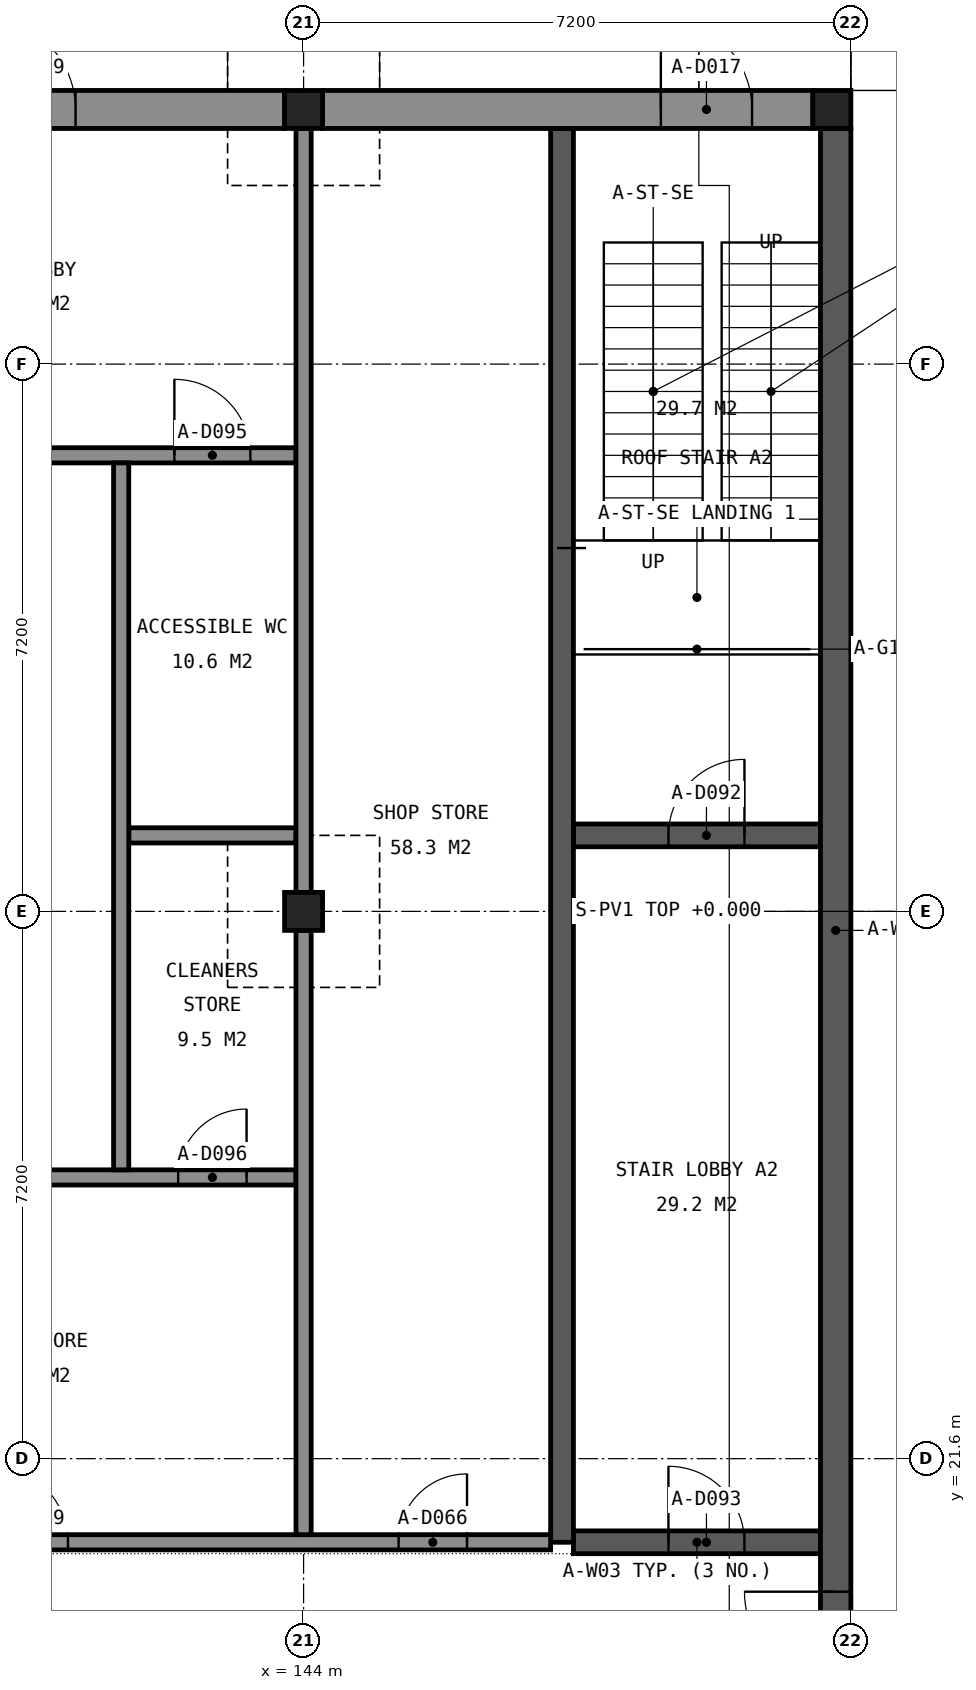
"""IFC4 building model, lengths in metres.
Left out: names, types, materials, properties, quantities, classifications, styles, units other than length and angle.
Written with IfcOpenShell. Run it as: python <this file> out.ifc"""

import sys

from ifc_helpers import new_model, si_unit, direction, frame, frame_2d, origin, origin_2d, place, context, subcontext, project, spatial, rectangle, extrude, element, fill, save


model = new_model("IFC4")
c1 = context("Model", 3, precision=1e-05, world=origin(), true_north=direction((0.0, 1.0)))
c2 = subcontext(c1, "Body", "Model", "MODEL_VIEW")
j1 = project(units=[si_unit("LENGTHUNIT", "METRE"), si_unit("PLANEANGLEUNIT", "RADIAN")], contexts=[c1])
p1 = place(None, origin())
s1 = spatial("IfcSite", under=j1, at=p1, CompositionType="ELEMENT")
p2 = place(p1, origin())
s2 = spatial("IfcBuilding", under=s1, at=p2, CompositionType="ELEMENT")
p3 = place(p2, origin())
s3 = spatial("IfcBuildingStorey", under=s2, at=p3, CompositionType="ELEMENT", Elevation=0.0)
for number, where, z_axis, x_axis in (
    (1, (144.0, 39.35, 0.0), (0.0, 0.0, 1.0), (1.0, 0.0, 0.0)),
    (2, (150.95, 39.35, 0.0), (0.0, 0.0, 1.0), (1.0, 0.0, 0.0)),
    (3, (144.0, 28.8, 0.0), (0.0, 0.0, 1.0), (1.0, 0.0, 0.0)),
):
    element("IfcColumn", number, at=place(p3, frame(where, z_axis=z_axis, x_axis=x_axis)), inside=s3, PredefinedType="COLUMN", context=c2, shape_type="SweptSolid", body=[
        extrude(rectangle(XDim=0.5, YDim=0.5, at=origin_2d()), origin(), (0.0, 0.0, 1.0), 3.7),
    ])
p4 = place(p3, frame((147.55, 20.5, 0.0), z_axis=(0.0, 0.0, 1.0), x_axis=(1.0, 0.0, 0.0)))
e4 = element("IfcWall", 4, at=p4, inside=s3, PredefinedType="SHEAR", context=c2, shape_type="SweptSolid", body=[
    extrude(rectangle(XDim=3.25, YDim=0.3, at=frame_2d((1.625, 0.0))), origin(), (0.0, 0.0, 1.0), 4.4),
])
p5 = place(p4, frame((1.25, 0.0, 0.0)))
e5 = element("IfcOpeningElement", 5, at=p5, cuts=e4, PredefinedType="OPENING", context=c2, shape_type="SweptSolid", body=[
    extrude(rectangle(XDim=1.0, YDim=2.1, at=frame_2d((0.5, 1.05))), frame((0.0, 0.16, 0.0), z_axis=(0.0, -1.0, 0.0), x_axis=(1.0, 0.0, 0.0)), (0.0, 0.0, 1.0), 0.32),
])
p6 = place(p3, frame((147.55, 29.8, 0.0), z_axis=(0.0, 0.0, 1.0), x_axis=(1.0, 0.0, 0.0)))
e6 = element("IfcWall", 6, at=p6, inside=s3, PredefinedType="SHEAR", context=c2, shape_type="SweptSolid", body=[
    extrude(rectangle(XDim=3.25, YDim=0.3, at=frame_2d((1.625, 0.0))), origin(), (0.0, 0.0, 1.0), 4.4),
])
p7 = place(p6, frame((1.25, 0.0, 0.0)))
e7 = element("IfcOpeningElement", 7, at=p7, cuts=e6, PredefinedType="OPENING", context=c2, shape_type="SweptSolid", body=[
    extrude(rectangle(XDim=1.0, YDim=2.1, at=frame_2d((0.5, 1.05))), frame((0.0, 0.16, 0.0), z_axis=(0.0, -1.0, 0.0), x_axis=(1.0, 0.0, 0.0)), (0.0, 0.0, 1.0), 0.32),
])
p8 = place(p3, frame((147.4, 20.5, 0.0), z_axis=(0.0, 0.0, 1.0), x_axis=(0.0, 1.0, 0.0)))
e8 = element("IfcWall", 8, at=p8, inside=s3, PredefinedType="SHEAR", context=c2, shape_type="SweptSolid", body=[
    extrude(rectangle(XDim=18.6, YDim=0.3, at=frame_2d((9.3, 0.0))), origin(), (0.0, 0.0, 1.0), 4.4),
])
p9 = place(p3, frame((151.0, 18.0, 0.0), z_axis=(0.0, 0.0, 1.0), x_axis=(0.0, 1.0, 0.0)))
e9 = element("IfcWall", 9, at=p9, inside=s3, PredefinedType="SHEAR", context=c2, shape_type="SweptSolid", body=[
    extrude(rectangle(XDim=21.1, YDim=0.4, at=frame_2d((10.55, 0.0))), origin(), (0.0, 0.0, 1.0), 4.4),
])
p10 = place(p9, frame((0.65, 0.0, 0.0)))
e10 = element("IfcOpeningElement", 10, at=p10, cuts=e9, PredefinedType="OPENING", context=c2, shape_type="SweptSolid", body=[
    extrude(rectangle(XDim=1.2, YDim=2.1, at=frame_2d((0.6, 1.05))), frame((0.0, 0.21, 0.0), z_axis=(0.0, -1.0, 0.0), x_axis=(1.0, 0.0, 0.0)), (0.0, 0.0, 1.0), 0.42),
])
p11 = place(p3, frame((137.05, 39.35, 0.0), z_axis=(0.0, 0.0, 1.0), x_axis=(1.0, 0.0, 0.0)))
e11 = element("IfcWall", 11, at=p11, inside=s3, PredefinedType="SOLIDWALL", context=c2, shape_type="SweptSolid", body=[
    extrude(rectangle(XDim=6.7, YDim=0.5, at=frame_2d((3.35, 0.0))), origin(), (0.0, 0.0, 1.0), 3.6),
])
p12 = place(p11, frame((2.75, 0.0, 0.0)))
e12 = element("IfcOpeningElement", 12, at=p12, cuts=e11, PredefinedType="OPENING", context=c2, shape_type="SweptSolid", body=[
    extrude(rectangle(XDim=1.2, YDim=2.1, at=frame_2d((0.6, 1.05))), frame((0.0, 0.26, 0.0), z_axis=(0.0, -1.0, 0.0), x_axis=(1.0, 0.0, 0.0)), (0.0, 0.0, 1.0), 0.52),
])
p13 = place(p3, frame((144.25, 39.35, 0.0), z_axis=(0.0, 0.0, 1.0), x_axis=(1.0, 0.0, 0.0)))
e13 = element("IfcWall", 13, at=p13, inside=s3, PredefinedType="SOLIDWALL", context=c2, shape_type="SweptSolid", body=[
    extrude(rectangle(XDim=6.45, YDim=0.5, at=frame_2d((3.225, 0.0))), origin(), (0.0, 0.0, 1.0), 3.6),
])
p14 = place(p13, frame((4.45, 0.0, 0.0)))
e14 = element("IfcOpeningElement", 14, at=p14, cuts=e13, PredefinedType="OPENING", context=c2, shape_type="SweptSolid", body=[
    extrude(rectangle(XDim=1.2, YDim=2.1, at=frame_2d((0.6, 1.05))), frame((0.0, 0.26, 0.0), z_axis=(0.0, -1.0, 0.0), x_axis=(1.0, 0.0, 0.0)), (0.0, 0.0, 1.0), 0.52),
])
p15 = place(p3, frame((54.35, 20.5, 0.0), z_axis=(0.0, 0.0, 1.0), x_axis=(1.0, 0.0, 0.0)))
e15 = element("IfcWall", 15, at=p15, inside=s3, PredefinedType="PARTITIONING", context=c2, shape_type="SweptSolid", body=[
    extrude(rectangle(XDim=92.9, YDim=0.2, at=frame_2d((46.45, 0.0))), origin(), (0.0, 0.0, 1.0), 3.5),
])
p16 = place(p15, frame((1.1, 0.0, 0.0)))
e16 = element("IfcOpeningElement", 16, at=p16, cuts=e15, PredefinedType="OPENING", context=c2, shape_type="SweptSolid", body=[
    extrude(rectangle(XDim=0.9, YDim=2.1, at=frame_2d((0.45, 1.05))), frame((0.0, 0.11, 0.0), z_axis=(0.0, -1.0, 0.0), x_axis=(1.0, 0.0, 0.0)), (0.0, 0.0, 1.0), 0.22),
])
p17 = place(p15, frame((90.9, 0.0, 0.0)))
e17 = element("IfcOpeningElement", 17, at=p17, cuts=e15, PredefinedType="OPENING", context=c2, shape_type="SweptSolid", body=[
    extrude(rectangle(XDim=0.9, YDim=2.1, at=frame_2d((0.45, 1.05))), frame((0.0, 0.11, 0.0), z_axis=(0.0, -1.0, 0.0), x_axis=(1.0, 0.0, 0.0)), (0.0, 0.0, 1.0), 0.22),
])
p18 = place(p15, frame((6.35, 0.0, 0.0)))
e18 = element("IfcOpeningElement", 18, at=p18, cuts=e15, PredefinedType="OPENING", context=c2, shape_type="SweptSolid", body=[
    extrude(rectangle(XDim=1.0, YDim=2.1, at=frame_2d((0.5, 1.05))), frame((0.0, 0.11, 0.0), z_axis=(0.0, -1.0, 0.0), x_axis=(1.0, 0.0, 0.0)), (0.0, 0.0, 1.0), 0.22),
])
p19 = place(p15, frame((13.55, 0.0, 0.0)))
e19 = element("IfcOpeningElement", 19, at=p19, cuts=e15, PredefinedType="OPENING", context=c2, shape_type="SweptSolid", body=[
    extrude(rectangle(XDim=1.0, YDim=2.1, at=frame_2d((0.5, 1.05))), frame((0.0, 0.11, 0.0), z_axis=(0.0, -1.0, 0.0), x_axis=(1.0, 0.0, 0.0)), (0.0, 0.0, 1.0), 0.22),
])
p20 = place(p15, frame((20.75, 0.0, 0.0)))
e20 = element("IfcOpeningElement", 20, at=p20, cuts=e15, PredefinedType="OPENING", context=c2, shape_type="SweptSolid", body=[
    extrude(rectangle(XDim=1.0, YDim=2.1, at=frame_2d((0.5, 1.05))), frame((0.0, 0.11, 0.0), z_axis=(0.0, -1.0, 0.0), x_axis=(1.0, 0.0, 0.0)), (0.0, 0.0, 1.0), 0.22),
])
p21 = place(p15, frame((27.95, 0.0, 0.0)))
e21 = element("IfcOpeningElement", 21, at=p21, cuts=e15, PredefinedType="OPENING", context=c2, shape_type="SweptSolid", body=[
    extrude(rectangle(XDim=1.0, YDim=2.1, at=frame_2d((0.5, 1.05))), frame((0.0, 0.11, 0.0), z_axis=(0.0, -1.0, 0.0), x_axis=(1.0, 0.0, 0.0)), (0.0, 0.0, 1.0), 0.22),
])
p22 = place(p15, frame((35.15, 0.0, 0.0)))
e22 = element("IfcOpeningElement", 22, at=p22, cuts=e15, PredefinedType="OPENING", context=c2, shape_type="SweptSolid", body=[
    extrude(rectangle(XDim=1.0, YDim=2.1, at=frame_2d((0.5, 1.05))), frame((0.0, 0.11, 0.0), z_axis=(0.0, -1.0, 0.0), x_axis=(1.0, 0.0, 0.0)), (0.0, 0.0, 1.0), 0.22),
])
p23 = place(p15, frame((42.35, 0.0, 0.0)))
e23 = element("IfcOpeningElement", 23, at=p23, cuts=e15, PredefinedType="OPENING", context=c2, shape_type="SweptSolid", body=[
    extrude(rectangle(XDim=1.0, YDim=2.1, at=frame_2d((0.5, 1.05))), frame((0.0, 0.11, 0.0), z_axis=(0.0, -1.0, 0.0), x_axis=(1.0, 0.0, 0.0)), (0.0, 0.0, 1.0), 0.22),
])
p24 = place(p15, frame((49.55, 0.0, 0.0)))
e24 = element("IfcOpeningElement", 24, at=p24, cuts=e15, PredefinedType="OPENING", context=c2, shape_type="SweptSolid", body=[
    extrude(rectangle(XDim=1.0, YDim=2.1, at=frame_2d((0.5, 1.05))), frame((0.0, 0.11, 0.0), z_axis=(0.0, -1.0, 0.0), x_axis=(1.0, 0.0, 0.0)), (0.0, 0.0, 1.0), 0.22),
])
p25 = place(p15, frame((56.75, 0.0, 0.0)))
e25 = element("IfcOpeningElement", 25, at=p25, cuts=e15, PredefinedType="OPENING", context=c2, shape_type="SweptSolid", body=[
    extrude(rectangle(XDim=1.0, YDim=2.1, at=frame_2d((0.5, 1.05))), frame((0.0, 0.11, 0.0), z_axis=(0.0, -1.0, 0.0), x_axis=(1.0, 0.0, 0.0)), (0.0, 0.0, 1.0), 0.22),
])
p26 = place(p15, frame((63.95, 0.0, 0.0)))
e26 = element("IfcOpeningElement", 26, at=p26, cuts=e15, PredefinedType="OPENING", context=c2, shape_type="SweptSolid", body=[
    extrude(rectangle(XDim=1.0, YDim=2.1, at=frame_2d((0.5, 1.05))), frame((0.0, 0.11, 0.0), z_axis=(0.0, -1.0, 0.0), x_axis=(1.0, 0.0, 0.0)), (0.0, 0.0, 1.0), 0.22),
])
p27 = place(p15, frame((71.15, 0.0, 0.0)))
e27 = element("IfcOpeningElement", 27, at=p27, cuts=e15, PredefinedType="OPENING", context=c2, shape_type="SweptSolid", body=[
    extrude(rectangle(XDim=1.0, YDim=2.1, at=frame_2d((0.5, 1.05))), frame((0.0, 0.11, 0.0), z_axis=(0.0, -1.0, 0.0), x_axis=(1.0, 0.0, 0.0)), (0.0, 0.0, 1.0), 0.22),
])
p28 = place(p15, frame((78.35, 0.0, 0.0)))
e28 = element("IfcOpeningElement", 28, at=p28, cuts=e15, PredefinedType="OPENING", context=c2, shape_type="SweptSolid", body=[
    extrude(rectangle(XDim=1.0, YDim=2.1, at=frame_2d((0.5, 1.05))), frame((0.0, 0.11, 0.0), z_axis=(0.0, -1.0, 0.0), x_axis=(1.0, 0.0, 0.0)), (0.0, 0.0, 1.0), 0.22),
])
p29 = place(p15, frame((85.55, 0.0, 0.0)))
e29 = element("IfcOpeningElement", 29, at=p29, cuts=e15, PredefinedType="OPENING", context=c2, shape_type="SweptSolid", body=[
    extrude(rectangle(XDim=1.0, YDim=2.1, at=frame_2d((0.5, 1.05))), frame((0.0, 0.11, 0.0), z_axis=(0.0, -1.0, 0.0), x_axis=(1.0, 0.0, 0.0)), (0.0, 0.0, 1.0), 0.22),
])
p30 = place(p3, frame((57.7, 25.3, 0.0), z_axis=(0.0, 0.0, 1.0), x_axis=(1.0, 0.0, 0.0)))
e30 = element("IfcWall", 30, at=p30, inside=s3, PredefinedType="PARTITIONING", context=c2, shape_type="SweptSolid", body=[
    extrude(rectangle(XDim=86.2, YDim=0.2, at=frame_2d((43.1, 0.0))), origin(), (0.0, 0.0, 1.0), 3.5),
])
p31 = place(p30, frame((3.0, 0.0, 0.0)))
e31 = element("IfcOpeningElement", 31, at=p31, cuts=e30, PredefinedType="OPENING", context=c2, shape_type="SweptSolid", body=[
    extrude(rectangle(XDim=1.0, YDim=2.1, at=frame_2d((0.5, 1.05))), frame((0.0, 0.11, 0.0), z_axis=(0.0, -1.0, 0.0), x_axis=(1.0, 0.0, 0.0)), (0.0, 0.0, 1.0), 0.22),
])
p32 = place(p30, frame((10.2, 0.0, 0.0)))
e32 = element("IfcOpeningElement", 32, at=p32, cuts=e30, PredefinedType="OPENING", context=c2, shape_type="SweptSolid", body=[
    extrude(rectangle(XDim=1.0, YDim=2.1, at=frame_2d((0.5, 1.05))), frame((0.0, 0.11, 0.0), z_axis=(0.0, -1.0, 0.0), x_axis=(1.0, 0.0, 0.0)), (0.0, 0.0, 1.0), 0.22),
])
p33 = place(p30, frame((17.4, 0.0, 0.0)))
e33 = element("IfcOpeningElement", 33, at=p33, cuts=e30, PredefinedType="OPENING", context=c2, shape_type="SweptSolid", body=[
    extrude(rectangle(XDim=1.0, YDim=2.1, at=frame_2d((0.5, 1.05))), frame((0.0, 0.11, 0.0), z_axis=(0.0, -1.0, 0.0), x_axis=(1.0, 0.0, 0.0)), (0.0, 0.0, 1.0), 0.22),
])
p34 = place(p30, frame((24.6, 0.0, 0.0)))
e34 = element("IfcOpeningElement", 34, at=p34, cuts=e30, PredefinedType="OPENING", context=c2, shape_type="SweptSolid", body=[
    extrude(rectangle(XDim=1.0, YDim=2.1, at=frame_2d((0.5, 1.05))), frame((0.0, 0.11, 0.0), z_axis=(0.0, -1.0, 0.0), x_axis=(1.0, 0.0, 0.0)), (0.0, 0.0, 1.0), 0.22),
])
p35 = place(p30, frame((31.8, 0.0, 0.0)))
e35 = element("IfcOpeningElement", 35, at=p35, cuts=e30, PredefinedType="OPENING", context=c2, shape_type="SweptSolid", body=[
    extrude(rectangle(XDim=1.0, YDim=2.1, at=frame_2d((0.5, 1.05))), frame((0.0, 0.11, 0.0), z_axis=(0.0, -1.0, 0.0), x_axis=(1.0, 0.0, 0.0)), (0.0, 0.0, 1.0), 0.22),
])
p36 = place(p30, frame((39.0, 0.0, 0.0)))
e36 = element("IfcOpeningElement", 36, at=p36, cuts=e30, PredefinedType="OPENING", context=c2, shape_type="SweptSolid", body=[
    extrude(rectangle(XDim=1.0, YDim=2.1, at=frame_2d((0.5, 1.05))), frame((0.0, 0.11, 0.0), z_axis=(0.0, -1.0, 0.0), x_axis=(1.0, 0.0, 0.0)), (0.0, 0.0, 1.0), 0.22),
])
p37 = place(p30, frame((46.2, 0.0, 0.0)))
e37 = element("IfcOpeningElement", 37, at=p37, cuts=e30, PredefinedType="OPENING", context=c2, shape_type="SweptSolid", body=[
    extrude(rectangle(XDim=1.0, YDim=2.1, at=frame_2d((0.5, 1.05))), frame((0.0, 0.11, 0.0), z_axis=(0.0, -1.0, 0.0), x_axis=(1.0, 0.0, 0.0)), (0.0, 0.0, 1.0), 0.22),
])
p38 = place(p30, frame((53.4, 0.0, 0.0)))
e38 = element("IfcOpeningElement", 38, at=p38, cuts=e30, PredefinedType="OPENING", context=c2, shape_type="SweptSolid", body=[
    extrude(rectangle(XDim=1.0, YDim=2.1, at=frame_2d((0.5, 1.05))), frame((0.0, 0.11, 0.0), z_axis=(0.0, -1.0, 0.0), x_axis=(1.0, 0.0, 0.0)), (0.0, 0.0, 1.0), 0.22),
])
p39 = place(p30, frame((60.6, 0.0, 0.0)))
e39 = element("IfcOpeningElement", 39, at=p39, cuts=e30, PredefinedType="OPENING", context=c2, shape_type="SweptSolid", body=[
    extrude(rectangle(XDim=1.0, YDim=2.1, at=frame_2d((0.5, 1.05))), frame((0.0, 0.11, 0.0), z_axis=(0.0, -1.0, 0.0), x_axis=(1.0, 0.0, 0.0)), (0.0, 0.0, 1.0), 0.22),
])
p40 = place(p30, frame((67.8, 0.0, 0.0)))
e40 = element("IfcOpeningElement", 40, at=p40, cuts=e30, PredefinedType="OPENING", context=c2, shape_type="SweptSolid", body=[
    extrude(rectangle(XDim=1.0, YDim=2.1, at=frame_2d((0.5, 1.05))), frame((0.0, 0.11, 0.0), z_axis=(0.0, -1.0, 0.0), x_axis=(1.0, 0.0, 0.0)), (0.0, 0.0, 1.0), 0.22),
])
p41 = place(p30, frame((75.0, 0.0, 0.0)))
e41 = element("IfcOpeningElement", 41, at=p41, cuts=e30, PredefinedType="OPENING", context=c2, shape_type="SweptSolid", body=[
    extrude(rectangle(XDim=1.0, YDim=2.1, at=frame_2d((0.5, 1.05))), frame((0.0, 0.11, 0.0), z_axis=(0.0, -1.0, 0.0), x_axis=(1.0, 0.0, 0.0)), (0.0, 0.0, 1.0), 0.22),
])
p42 = place(p30, frame((84.65, 0.0, 0.0)))
e42 = element("IfcOpeningElement", 42, at=p42, cuts=e30, PredefinedType="OPENING", context=c2, shape_type="SweptSolid", body=[
    extrude(rectangle(XDim=0.9, YDim=2.1, at=frame_2d((0.45, 1.05))), frame((0.0, 0.11, 0.0), z_axis=(0.0, -1.0, 0.0), x_axis=(1.0, 0.0, 0.0)), (0.0, 0.0, 1.0), 0.22),
])
p43 = place(p3, frame((141.7, 29.8, 0.0), z_axis=(0.0, 0.0, 1.0), x_axis=(1.0, 0.0, 0.0)))
e43 = element("IfcWall", 43, at=p43, inside=s3, PredefinedType="PARTITIONING", context=c2, shape_type="SweptSolid", body=[
    extrude(rectangle(XDim=2.2, YDim=0.2, at=frame_2d((1.1, 0.0))), origin(), (0.0, 0.0, 1.0), 3.5),
])
p44 = place(p3, frame((136.9, 34.8, 0.0), z_axis=(0.0, 0.0, 1.0), x_axis=(1.0, 0.0, 0.0)))
e44 = element("IfcWall", 44, at=p44, inside=s3, PredefinedType="PARTITIONING", context=c2, shape_type="SweptSolid", body=[
    extrude(rectangle(XDim=7.0, YDim=0.2, at=frame_2d((3.5, 0.0))), origin(), (0.0, 0.0, 1.0), 3.5),
])
p45 = place(p44, frame((1.8, 0.0, 0.0)))
e45 = element("IfcOpeningElement", 45, at=p45, cuts=e44, PredefinedType="OPENING", context=c2, shape_type="SweptSolid", body=[
    extrude(rectangle(XDim=1.0, YDim=2.1, at=frame_2d((0.5, 1.05))), frame((0.0, 0.11, 0.0), z_axis=(0.0, -1.0, 0.0), x_axis=(1.0, 0.0, 0.0)), (0.0, 0.0, 1.0), 0.22),
])
p46 = place(p44, frame((5.4, 0.0, 0.0)))
e46 = element("IfcOpeningElement", 46, at=p46, cuts=e44, PredefinedType="OPENING", context=c2, shape_type="SweptSolid", body=[
    extrude(rectangle(XDim=1.0, YDim=2.1, at=frame_2d((0.5, 1.05))), frame((0.0, 0.11, 0.0), z_axis=(0.0, -1.0, 0.0), x_axis=(1.0, 0.0, 0.0)), (0.0, 0.0, 1.0), 0.22),
])
p47 = place(p3, frame((141.6, 25.4, 0.0), z_axis=(0.0, 0.0, 1.0), x_axis=(0.0, 1.0, 0.0)))
e47 = element("IfcWall", 47, at=p47, inside=s3, PredefinedType="PARTITIONING", context=c2, shape_type="SweptSolid", body=[
    extrude(rectangle(XDim=9.3, YDim=0.2, at=frame_2d((4.65, 0.0))), origin(), (0.0, 0.0, 1.0), 3.5),
])
p48 = place(p3, frame((144.0, 20.6, 0.0), z_axis=(0.0, 0.0, 1.0), x_axis=(0.0, 1.0, 0.0)))
e48 = element("IfcWall", 48, at=p48, inside=s3, PredefinedType="PARTITIONING", context=c2, shape_type="SweptSolid", body=[
    extrude(rectangle(XDim=7.95, YDim=0.2, at=frame_2d((3.975, 0.0))), origin(), (0.0, 0.0, 1.0), 3.5),
])
p49 = place(p3, frame((144.0, 29.05, 0.0), z_axis=(0.0, 0.0, 1.0), x_axis=(0.0, 1.0, 0.0)))
e49 = element("IfcWall", 49, at=p49, inside=s3, PredefinedType="PARTITIONING", context=c2, shape_type="SweptSolid", body=[
    extrude(rectangle(XDim=10.05, YDim=0.2, at=frame_2d((5.025, 0.0))), origin(), (0.0, 0.0, 1.0), 3.5),
])
p50 = place(p14, origin())
e50 = element("IfcDoor", 50, at=p50, inside=s3, OperationType="SINGLE_SWING_LEFT", PredefinedType="DOOR", context=c2, shape_type="SweptSolid", body=[
    extrude(rectangle(XDim=1.2, YDim=2.1, at=frame_2d((0.6, 1.05))), frame((0.0, 0.025, 0.0), z_axis=(0.0, -1.0, 0.0), x_axis=(1.0, 0.0, 0.0)), (0.0, 0.0, 1.0), 0.05),
])
fill(e14, e50)
p51 = place(p12, origin())
e51 = element("IfcDoor", 51, at=p51, inside=s3, OperationType="SINGLE_SWING_LEFT", PredefinedType="DOOR", context=c2, shape_type="SweptSolid", body=[
    extrude(rectangle(XDim=1.2, YDim=2.1, at=frame_2d((0.6, 1.05))), frame((0.0, 0.025, 0.0), z_axis=(0.0, -1.0, 0.0), x_axis=(1.0, 0.0, 0.0)), (0.0, 0.0, 1.0), 0.05),
])
fill(e12, e51)
p52 = place(p10, origin())
e52 = element("IfcDoor", 52, at=p52, inside=s3, OperationType="SINGLE_SWING_RIGHT", PredefinedType="DOOR", context=c2, shape_type="SweptSolid", body=[
    extrude(rectangle(XDim=1.2, YDim=2.1, at=frame_2d((0.6, 1.05))), frame((0.0, 0.025, 0.0), z_axis=(0.0, -1.0, 0.0), x_axis=(1.0, 0.0, 0.0)), (0.0, 0.0, 1.0), 0.05),
])
fill(e10, e52)
p53 = place(p17, origin())
e53 = element("IfcDoor", 53, at=p53, inside=s3, OperationType="SINGLE_SWING_RIGHT", PredefinedType="DOOR", context=c2, shape_type="SweptSolid", body=[
    extrude(rectangle(XDim=0.9, YDim=2.1, at=frame_2d((0.45, 1.05))), frame((0.0, 0.025, 0.0), z_axis=(0.0, -1.0, 0.0), x_axis=(1.0, 0.0, 0.0)), (0.0, 0.0, 1.0), 0.05),
])
fill(e17, e53)
p54 = place(p29, origin())
e54 = element("IfcDoor", 54, at=p54, inside=s3, OperationType="SINGLE_SWING_LEFT", PredefinedType="DOOR", context=c2, shape_type="SweptSolid", body=[
    extrude(rectangle(XDim=1.0, YDim=2.1, at=frame_2d((0.5, 1.05))), frame((0.0, 0.025, 0.0), z_axis=(0.0, -1.0, 0.0), x_axis=(1.0, 0.0, 0.0)), (0.0, 0.0, 1.0), 0.05),
])
fill(e29, e54)
p55 = place(p7, origin())
e55 = element("IfcDoor", 55, at=p55, inside=s3, OperationType="SINGLE_SWING_RIGHT", PredefinedType="DOOR", context=c2, shape_type="SweptSolid", body=[
    extrude(rectangle(XDim=1.0, YDim=2.1, at=frame_2d((0.5, 1.05))), frame((0.0, 0.025, 0.0), z_axis=(0.0, -1.0, 0.0), x_axis=(1.0, 0.0, 0.0)), (0.0, 0.0, 1.0), 0.05),
])
fill(e7, e55)
p56 = place(p5, origin())
e56 = element("IfcDoor", 56, at=p56, inside=s3, OperationType="SINGLE_SWING_LEFT", PredefinedType="DOOR", context=c2, shape_type="SweptSolid", body=[
    extrude(rectangle(XDim=1.0, YDim=2.1, at=frame_2d((0.5, 1.05))), frame((0.0, 0.025, 0.0), z_axis=(0.0, -1.0, 0.0), x_axis=(1.0, 0.0, 0.0)), (0.0, 0.0, 1.0), 0.05),
])
fill(e5, e56)
p57 = place(p46, origin())
e57 = element("IfcDoor", 57, at=p57, inside=s3, OperationType="SINGLE_SWING_LEFT", PredefinedType="DOOR", context=c2, shape_type="SweptSolid", body=[
    extrude(rectangle(XDim=1.0, YDim=2.1, at=frame_2d((0.5, 1.05))), frame((0.0, 0.025, 0.0), z_axis=(0.0, -1.0, 0.0), x_axis=(1.0, 0.0, 0.0)), (0.0, 0.0, 1.0), 0.05),
])
fill(e46, e57)
p58 = place(p42, origin())
e58 = element("IfcDoor", 58, at=p58, inside=s3, OperationType="SINGLE_SWING_RIGHT", PredefinedType="DOOR", context=c2, shape_type="SweptSolid", body=[
    extrude(rectangle(XDim=0.9, YDim=2.1, at=frame_2d((0.45, 1.05))), frame((0.0, 0.025, 0.0), z_axis=(0.0, -1.0, 0.0), x_axis=(1.0, 0.0, 0.0)), (0.0, 0.0, 1.0), 0.05),
])
fill(e42, e58)
save(model, sys.argv[1])
